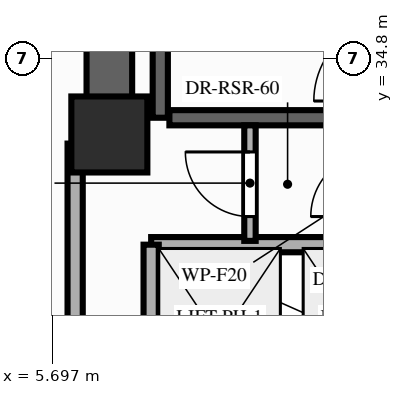
"""IFC4 building model, lengths in metres.
Left out: names, types, materials, properties, quantities, classifications, styles, units other than length and angle.
Written with IfcOpenShell. Run it as: python <this file> out.ifc"""

import sys

from ifc_helpers import new_model, si_unit, direction, frame, frame_2d, origin, origin_2d, place, context, subcontext, project, spatial, rectangle, extrude, element, fill, save


model = new_model("IFC4")
c1 = context("Model", 3, precision=1e-05, world=origin(), true_north=direction((0.0, 1.0)))
c2 = subcontext(c1, "Body", "Model", "MODEL_VIEW")
j1 = project(units=[si_unit("LENGTHUNIT", "METRE"), si_unit("PLANEANGLEUNIT", "RADIAN")], contexts=[c1])
p1 = place(None, origin())
s1 = spatial("IfcSite", under=j1, at=p1, CompositionType="ELEMENT")
p2 = place(p1, origin())
s2 = spatial("IfcBuilding", under=s1, at=p2, CompositionType="ELEMENT")
p3 = place(p2, frame((0.0, 0.0, 163.2)))
s3 = spatial("IfcBuildingStorey", under=s2, at=p3, CompositionType="ELEMENT", Elevation=163.2)
p4 = place(p3, frame((6.45, 33.8, 0.0), z_axis=(0.0, 0.0, 1.0), x_axis=(1.0, 0.0, 0.0)))
e1 = element("IfcColumn", 1, at=p4, inside=s3, PredefinedType="COLUMN", context=c2, shape_type="SweptSolid", body=[
    extrude(rectangle(XDim=1.0, YDim=1.0, at=origin_2d()), origin(), (0.0, 0.0, 1.0), 3.2),
])
p5 = place(p3, frame((6.45, 33.8, 0.0), z_axis=(0.0, 0.0, 1.0), x_axis=(0.0, 1.0, 0.0)))
e2 = element("IfcWall", 2, at=p5, inside=s3, PredefinedType="SHEAR", context=c2, shape_type="SweptSolid", body=[
    extrude(rectangle(XDim=7.95, YDim=0.6, at=frame_2d((3.975, 0.0))), origin(), (0.0, 0.0, 1.0), 3.02),
])
p6 = place(p3, frame((7.12, 34.02, 0.0), z_axis=(0.0, 0.0, 1.0), x_axis=(0.0, 1.0, 0.0)))
e3 = element("IfcWall", 3, at=p6, inside=s3, PredefinedType="SHEAR", context=c2, shape_type="SweptSolid", body=[
    extrude(rectangle(XDim=7.78, YDim=0.2, at=frame_2d((3.89, 0.0))), origin(), (0.0, 0.0, 1.0), 3.02),
])
p7 = place(p3, frame((7.24, 34.02, 0.0), z_axis=(0.0, 0.0, 1.0), x_axis=(1.0, 0.0, 0.0)))
e4 = element("IfcWall", 4, at=p7, inside=s3, PredefinedType="SHEAR", context=c2, shape_type="SweptSolid", body=[
    extrude(rectangle(XDim=2.88, YDim=0.2, at=frame_2d((1.44, 0.0))), origin(), (0.0, 0.0, 1.0), 3.02),
])
p8 = place(p3, frame((7.0, 32.35, 0.0), z_axis=(0.0, 0.0, 1.0), x_axis=(1.0, 0.0, 0.0)))
e5 = element("IfcWall", 5, at=p8, inside=s3, PredefinedType="MOVABLE", context=c2, shape_type="SweptSolid", body=[
    extrude(rectangle(XDim=5.55, YDim=0.2, at=frame_2d((2.775, 0.0))), origin(), (0.0, 0.0, 1.0), 3.02),
])
p9 = place(p3, frame((7.0, 29.85, 0.0), z_axis=(0.0, 0.0, 1.0), x_axis=(0.0, 1.0, 0.0)))
e6 = element("IfcWall", 6, at=p9, inside=s3, PredefinedType="MOVABLE", context=c2, shape_type="SweptSolid", body=[
    extrude(rectangle(XDim=2.5, YDim=0.2, at=frame_2d((1.25, 0.0))), origin(), (0.0, 0.0, 1.0), 3.02),
])
p10 = place(p3, frame((8.3, 32.4, 0.0), z_axis=(0.0, 0.0, 1.0), x_axis=(0.0, 1.0, 0.0)))
e7 = element("IfcWall", 7, at=p10, inside=s3, PredefinedType="PARTITIONING", context=c2, shape_type="SweptSolid", body=[
    extrude(rectangle(XDim=1.52, YDim=0.15, at=frame_2d((0.76, 0.0))), origin(), (0.0, 0.0, 1.0), 2.45),
])
p11 = place(p10, frame((0.32, 0.0, 0.0)))
e8 = element("IfcOpeningElement", 8, at=p11, cuts=e7, PredefinedType="OPENING", context=c2, shape_type="SweptSolid", body=[
    extrude(rectangle(XDim=0.85, YDim=2.05, at=frame_2d((0.425, 1.025))), frame((0.0, 0.085, 0.0), z_axis=(0.0, -1.0, 0.0), x_axis=(1.0, 0.0, 0.0)), (0.0, 0.0, 1.0), 0.17),
])
p12 = place(p3, frame((6.0, 28.1, 0.0), z_axis=(0.0, 0.0, 1.0), x_axis=(0.0, 1.0, 0.0)))
e9 = element("IfcWall", 9, at=p12, inside=s3, PredefinedType="PARTITIONING", context=c2, shape_type="SweptSolid", body=[
    extrude(rectangle(XDim=5.58, YDim=0.2, at=frame_2d((2.79, 0.0))), origin(), (0.0, 0.0, 1.0), 2.45),
])
p13 = place(p11, origin())
e10 = element("IfcDoor", 10, at=p13, inside=s3, OperationType="SINGLE_SWING_RIGHT", PredefinedType="DOOR", context=c2, shape_type="SweptSolid", body=[
    extrude(rectangle(XDim=0.85, YDim=2.05, at=frame_2d((0.425, 1.025))), frame((0.0, 0.025, 0.0), z_axis=(0.0, -1.0, 0.0), x_axis=(1.0, 0.0, 0.0)), (0.0, 0.0, 1.0), 0.05),
])
fill(e8, e10)
save(model, sys.argv[1])
